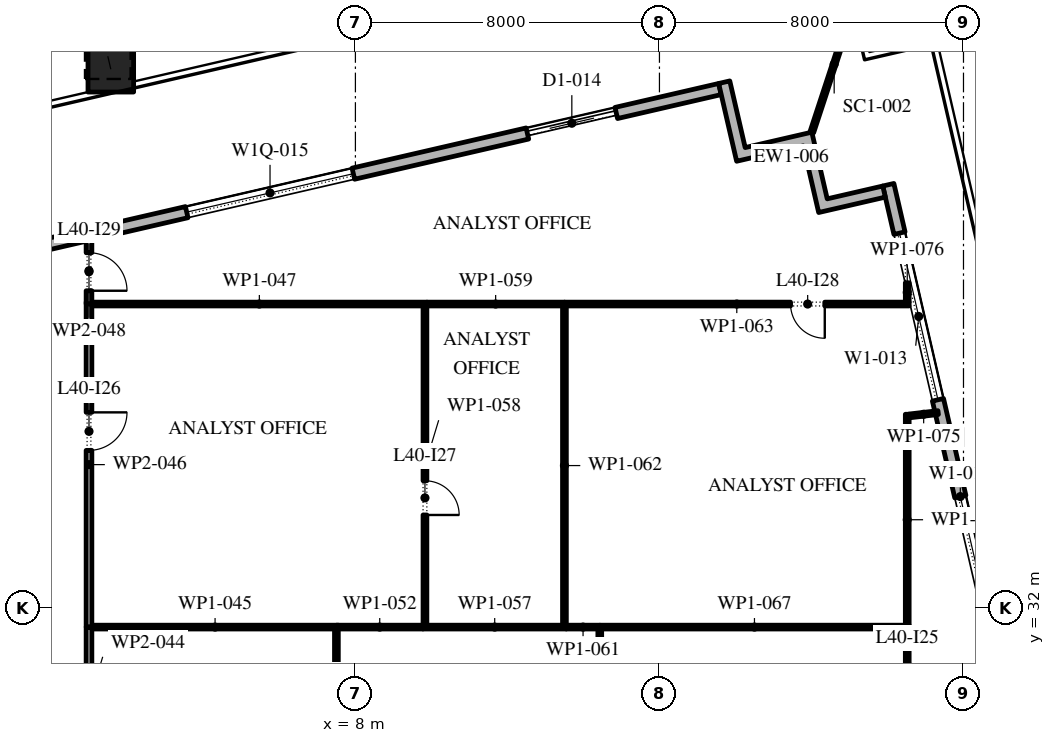
"""IFC4 building model, lengths in metres.
Left out: names, types, materials, properties, quantities, classifications, styles, units other than length and angle.
Written with IfcOpenShell. Run it as: python <this file> out.ifc"""

import sys

from ifc_helpers import new_model, si_unit, direction, frame, frame_2d, origin, origin_2d, place, context, subcontext, project, spatial, polyline, rectangle, outline, extrude, element, fill, save


model = new_model("IFC4")
c1 = context("Model", 3, precision=1e-05, world=origin(), true_north=direction((0.0, 1.0)))
c2 = subcontext(c1, "Body", "Model", "MODEL_VIEW")
j1 = project(units=[si_unit("LENGTHUNIT", "METRE"), si_unit("PLANEANGLEUNIT", "RADIAN")], contexts=[c1])
p1 = place(None, origin())
s1 = spatial("IfcSite", under=j1, at=p1, CompositionType="ELEMENT")
p2 = place(p1, origin())
s2 = spatial("IfcBuilding", under=s1, at=p2, CompositionType="ELEMENT")
p3 = place(p2, frame((0.0, 0.0, 184.2)))
s3 = spatial("IfcBuildingStorey", under=s2, at=p3, CompositionType="ELEMENT", Elevation=184.2)
p4 = place(p3, frame((1.564, 46.178, 0.0), z_axis=(-0.018825666958, 0.081616506903, 0.99648599592), x_axis=(-0.974414501624, -0.224758490439, 0.0)))
e1 = element("IfcColumn", 1, at=p4, inside=s3, PredefinedType="COLUMN", context=c2, shape_type="SweptSolid", body=[
    extrude(rectangle(XDim=1.2, YDim=1.2, at=origin_2d()), origin(), (0.0, 0.0, 1.0), 4.215),
])
p5 = place(p3, frame((33.157, -5.092, 0.0), z_axis=(0.0, 0.0, 1.0), x_axis=(-0.224950279389, 0.974370243697, 0.0)))
e2 = element("IfcWall", 2, at=p5, inside=s3, PredefinedType="STANDARD", context=c2, shape_type="SweptSolid", body=[
    extrude(rectangle(XDim=49.5, YDim=0.3, at=frame_2d((24.75, 0.0))), origin(), (0.0, 0.0, 1.0), 4.0),
])
p6 = place(p5, frame((2.207, 0.0, 0.0)))
e3 = element("IfcOpeningElement", 3, at=p6, cuts=e2, PredefinedType="OPENING", context=c2, shape_type="SweptSolid", body=[
    extrude(rectangle(XDim=2.4, YDim=3.125, at=frame_2d((1.2, 1.562))), frame((0.0, 0.16, 0.0), z_axis=(0.0, -1.0, 0.0), x_axis=(1.0, 0.0, 0.0)), (0.0, 0.0, 1.0), 0.32),
])
p7 = place(p5, frame((8.121, 0.0, 0.45)))
e4 = element("IfcOpeningElement", 4, at=p7, cuts=e2, PredefinedType="OPENING", context=c2, shape_type="SweptSolid", body=[
    extrude(rectangle(XDim=4.5, YDim=2.875, at=frame_2d((2.25, 1.438))), frame((0.0, 0.16, 0.0), z_axis=(0.0, -1.0, 0.0), x_axis=(1.0, 0.0, 0.0)), (0.0, 0.0, 1.0), 0.32),
])
p8 = place(p5, frame((15.236, 0.0, 0.45)))
e5 = element("IfcOpeningElement", 5, at=p8, cuts=e2, PredefinedType="OPENING", context=c2, shape_type="SweptSolid", body=[
    extrude(rectangle(XDim=4.5, YDim=2.875, at=frame_2d((2.25, 1.438))), frame((0.0, 0.16, 0.0), z_axis=(0.0, -1.0, 0.0), x_axis=(1.0, 0.0, 0.0)), (0.0, 0.0, 1.0), 0.32),
])
p9 = place(p5, frame((22.35, 0.0, 0.45)))
e6 = element("IfcOpeningElement", 6, at=p9, cuts=e2, PredefinedType="OPENING", context=c2, shape_type="SweptSolid", body=[
    extrude(rectangle(XDim=4.5, YDim=3.0, at=frame_2d((2.25, 1.5))), frame((0.0, 0.16, 0.0), z_axis=(0.0, -1.0, 0.0), x_axis=(1.0, 0.0, 0.0)), (0.0, 0.0, 1.0), 0.32),
])
p10 = place(p5, frame((30.514, 0.0, 0.0)))
e7 = element("IfcOpeningElement", 7, at=p10, cuts=e2, PredefinedType="OPENING", context=c2, shape_type="SweptSolid", body=[
    extrude(rectangle(XDim=2.4, YDim=3.45, at=frame_2d((1.2, 1.725))), frame((0.0, 0.16, 0.0), z_axis=(0.0, -1.0, 0.0), x_axis=(1.0, 0.0, 0.0)), (0.0, 0.0, 1.0), 0.32),
])
p11 = place(p5, frame((36.579, 0.0, 0.45)))
e8 = element("IfcOpeningElement", 8, at=p11, cuts=e2, PredefinedType="OPENING", context=c2, shape_type="SweptSolid", body=[
    extrude(rectangle(XDim=4.5, YDim=3.05, at=frame_2d((2.25, 1.525))), frame((0.0, 0.16, 0.0), z_axis=(0.0, -1.0, 0.0), x_axis=(1.0, 0.0, 0.0)), (0.0, 0.0, 1.0), 0.32),
])
p12 = place(p5, frame((43.693, 0.0, 0.45)))
e9 = element("IfcOpeningElement", 9, at=p12, cuts=e2, PredefinedType="OPENING", context=c2, shape_type="SweptSolid", body=[
    extrude(rectangle(XDim=4.5, YDim=3.05, at=frame_2d((2.25, 1.525))), frame((0.0, 0.16, 0.0), z_axis=(0.0, -1.0, 0.0), x_axis=(1.0, 0.0, 0.0)), (0.0, 0.0, 1.0), 0.32),
])
p13 = place(p3, frame((17.592, 45.657, 0.0), z_axis=(0.0, 0.0, 1.0), x_axis=(-0.974370243697, -0.224950279389, 0.0)))
e10 = element("IfcWall", 10, at=p13, inside=s3, PredefinedType="STANDARD", context=c2, shape_type="SweptSolid", body=[
    extrude(rectangle(XDim=49.5, YDim=0.3, at=frame_2d((24.75, 0.0))), origin(), (0.0, 0.0, 1.0), 4.0),
])
p14 = place(p13, frame((2.8, 0.0, 0.0)))
e11 = element("IfcOpeningElement", 11, at=p14, cuts=e10, PredefinedType="OPENING", context=c2, shape_type="SweptSolid", body=[
    extrude(rectangle(XDim=2.4, YDim=3.5, at=frame_2d((1.2, 1.75))), frame((0.0, 0.16, 0.0), z_axis=(0.0, -1.0, 0.0), x_axis=(1.0, 0.0, 0.0)), (0.0, 0.0, 1.0), 0.32),
])
p15 = place(p13, frame((9.9, 0.0, 0.45)))
e12 = element("IfcOpeningElement", 12, at=p15, cuts=e10, PredefinedType="OPENING", context=c2, shape_type="SweptSolid", body=[
    extrude(rectangle(XDim=4.5, YDim=2.45, at=frame_2d((2.25, 1.225))), frame((0.0, 0.16, 0.0), z_axis=(0.0, -1.0, 0.0), x_axis=(1.0, 0.0, 0.0)), (0.0, 0.0, 1.0), 0.32),
])
p16 = place(p13, frame((18.2, 0.0, 0.45)))
e13 = element("IfcOpeningElement", 13, at=p16, cuts=e10, PredefinedType="OPENING", context=c2, shape_type="SweptSolid", body=[
    extrude(rectangle(XDim=4.5, YDim=2.45, at=frame_2d((2.25, 1.225))), frame((0.0, 0.16, 0.0), z_axis=(0.0, -1.0, 0.0), x_axis=(1.0, 0.0, 0.0)), (0.0, 0.0, 1.0), 0.32),
])
p17 = place(p13, frame((26.5, 0.0, 0.45)))
e14 = element("IfcOpeningElement", 14, at=p17, cuts=e10, PredefinedType="OPENING", context=c2, shape_type="SweptSolid", body=[
    extrude(rectangle(XDim=4.5, YDim=2.525, at=frame_2d((2.25, 1.262))), frame((0.0, 0.16, 0.0), z_axis=(0.0, -1.0, 0.0), x_axis=(1.0, 0.0, 0.0)), (0.0, 0.0, 1.0), 0.32),
])
p18 = place(p13, frame((35.85, 0.0, 0.0)))
e15 = element("IfcOpeningElement", 15, at=p18, cuts=e10, PredefinedType="OPENING", context=c2, shape_type="SweptSolid", body=[
    extrude(rectangle(XDim=2.4, YDim=3.5, at=frame_2d((1.2, 1.75))), frame((0.0, 0.16, 0.0), z_axis=(0.0, -1.0, 0.0), x_axis=(1.0, 0.0, 0.0)), (0.0, 0.0, 1.0), 0.32),
])
p19 = place(p13, frame((43.1, 0.0, 0.45)))
e16 = element("IfcOpeningElement", 16, at=p19, cuts=e10, PredefinedType="OPENING", context=c2, shape_type="SweptSolid", body=[
    extrude(rectangle(XDim=4.5, YDim=2.675, at=frame_2d((2.25, 1.337))), frame((0.0, 0.16, 0.0), z_axis=(0.0, -1.0, 0.0), x_axis=(1.0, 0.0, 0.0)), (0.0, 0.0, 1.0), 0.32),
])
p20 = place(p3, origin())
e17 = element("IfcWall", 17, at=p20, inside=s3, PredefinedType="STANDARD", context=c2, shape_type="SweptSolid", body=[
    extrude(outline(polyline([(19.785, 44.162), (18.031, 43.757), (17.558, 45.803), (17.851, 45.871), (18.256, 44.117), (20.01, 44.522), (20.414, 42.768), (21.876, 43.105), (21.943, 42.813), (20.19, 42.408), (19.785, 44.162)])), origin(), (0.0, 0.0, 1.0), 4.0),
])
p21 = place(p3, frame((20.01, 44.522, -0.05), z_axis=(0.0, 0.0, 1.0), x_axis=(0.312333902814, 0.949972385469, 0.0)))
e18 = element("IfcWall", 18, at=p21, inside=s3, PredefinedType="STANDARD", context=c2, shape_type="SweptSolid", body=[
    extrude(rectangle(XDim=3.764, YDim=0.1, at=frame_2d((1.882, 0.0))), origin(), (0.0, 0.0, 1.0), 4.05),
])
p22 = place(p3, frame((0.99, 31.5, 0.0), z_axis=(0.0, 0.0, 1.0), x_axis=(0.0, -1.0, 0.0)))
e19 = element("IfcWall", 19, at=p22, inside=s3, PredefinedType="PARTITIONING", context=c2, shape_type="SweptSolid", body=[
    extrude(rectangle(XDim=3.95, YDim=0.15, at=frame_2d((1.975, 0.0))), origin(), (0.0, 0.0, 1.0), 4.0),
])
p23 = place(p22, frame((2.35, 0.0, 0.0)))
e20 = element("IfcOpeningElement", 20, at=p23, cuts=e19, PredefinedType="OPENING", context=c2, shape_type="SweptSolid", body=[
    extrude(rectangle(XDim=1.0, YDim=2.1, at=frame_2d((0.5, 1.05))), frame((0.0, 0.085, 0.0), z_axis=(0.0, -1.0, 0.0), x_axis=(1.0, 0.0, 0.0)), (0.0, 0.0, 1.0), 0.17),
])
p24 = place(p3, frame((1.065, 31.5, 0.0), z_axis=(0.0, 0.0, 1.0), x_axis=(1.0, 0.0, 0.0)))
e21 = element("IfcWall", 21, at=p24, inside=s3, PredefinedType="PARTITIONING", context=c2, shape_type="SweptSolid", body=[
    extrude(rectangle(XDim=6.485, YDim=0.1, at=frame_2d((3.243, 0.0))), origin(), (0.0, 0.0, 1.0), 4.0),
])
p25 = place(p3, frame((0.99, 40.05, 0.0), z_axis=(0.0, 0.0, 1.0), x_axis=(0.0, -1.0, 0.0)))
e22 = element("IfcWall", 22, at=p25, inside=s3, PredefinedType="PARTITIONING", context=c2, shape_type="SweptSolid", body=[
    extrude(rectangle(XDim=8.55, YDim=0.15, at=frame_2d((4.275, 0.0))), origin(), (0.0, 0.0, 1.0), 4.0),
])
p26 = place(p25, frame((2.9, 0.0, 0.0)))
e23 = element("IfcOpeningElement", 23, at=p26, cuts=e22, PredefinedType="OPENING", context=c2, shape_type="SweptSolid", body=[
    extrude(rectangle(XDim=1.0, YDim=2.1, at=frame_2d((0.5, 1.05))), frame((0.0, 0.085, 0.0), z_axis=(0.0, -1.0, 0.0), x_axis=(1.0, 0.0, 0.0)), (0.0, 0.0, 1.0), 0.17),
])
p27 = place(p3, frame((1.065, 40.0, 0.0), z_axis=(0.0, 0.0, 1.0), x_axis=(1.0, 0.0, 0.0)))
e24 = element("IfcWall", 24, at=p27, inside=s3, PredefinedType="PARTITIONING", context=c2, shape_type="SweptSolid", body=[
    extrude(rectangle(XDim=8.815, YDim=0.1, at=frame_2d((4.407, 0.0))), origin(), (0.0, 0.0, 1.0), 4.0),
])
p28 = place(p3, frame((0.99, 41.753, 0.0), z_axis=(0.0, 0.0, 1.0), x_axis=(0.0, -1.0, 0.0)))
e25 = element("IfcWall", 25, at=p28, inside=s3, PredefinedType="PARTITIONING", context=c2, shape_type="SweptSolid", body=[
    extrude(rectangle(XDim=1.753, YDim=0.15, at=frame_2d((0.876, 0.0))), origin(), (0.0, 0.0, 1.0), 4.0),
])
p29 = place(p28, frame((0.403, 0.0, 0.0)))
e26 = element("IfcOpeningElement", 26, at=p29, cuts=e25, PredefinedType="OPENING", context=c2, shape_type="SweptSolid", body=[
    extrude(rectangle(XDim=1.0, YDim=2.1, at=frame_2d((0.5, 1.05))), frame((0.0, 0.085, 0.0), z_axis=(0.0, -1.0, 0.0), x_axis=(1.0, 0.0, 0.0)), (0.0, 0.0, 1.0), 0.17),
])
p30 = place(p3, frame((7.5, 31.45, 0.0), z_axis=(0.0, 0.0, 1.0), x_axis=(0.0, -1.0, 0.0)))
e27 = element("IfcWall", 27, at=p30, inside=s3, PredefinedType="PARTITIONING", context=c2, shape_type="SweptSolid", body=[
    extrude(rectangle(XDim=3.9, YDim=0.1, at=frame_2d((1.95, 0.0))), origin(), (0.0, 0.0, 1.0), 4.0),
])
p31 = place(p30, frame((1.85, 0.0, 0.0)))
e28 = element("IfcOpeningElement", 28, at=p31, cuts=e27, PredefinedType="OPENING", context=c2, shape_type="SweptSolid", body=[
    extrude(rectangle(XDim=0.9, YDim=2.1, at=frame_2d((0.45, 1.05))), frame((0.0, 0.06, 0.0), z_axis=(0.0, -1.0, 0.0), x_axis=(1.0, 0.0, 0.0)), (0.0, 0.0, 1.0), 0.12),
])
p32 = place(p3, frame((7.5, 31.5, 0.0), z_axis=(0.0, 0.0, 1.0), x_axis=(1.0, 0.0, 0.0)))
e29 = element("IfcWall", 29, at=p32, inside=s3, PredefinedType="PARTITIONING", context=c2, shape_type="SweptSolid", body=[
    extrude(rectangle(XDim=2.28, YDim=0.1, at=frame_2d((1.14, 0.0))), origin(), (0.0, 0.0, 1.0), 4.0),
])
p33 = place(p3, frame((9.78, 31.5, 0.0), z_axis=(0.0, 0.0, 1.0), x_axis=(1.0, 0.0, 0.0)))
e30 = element("IfcWall", 30, at=p33, inside=s3, PredefinedType="PARTITIONING", context=c2, shape_type="SweptSolid", body=[
    extrude(rectangle(XDim=3.77, YDim=0.1, at=frame_2d((1.885, 0.0))), origin(), (0.0, 0.0, 1.0), 4.0),
])
p34 = place(p3, frame((9.83, 39.95, 0.0), z_axis=(0.0, 0.0, 1.0), x_axis=(0.0, -1.0, 0.0)))
e31 = element("IfcWall", 31, at=p34, inside=s3, PredefinedType="PARTITIONING", context=c2, shape_type="SweptSolid", body=[
    extrude(rectangle(XDim=8.4, YDim=0.1, at=frame_2d((4.2, 0.0))), origin(), (0.0, 0.0, 1.0), 4.0),
])
p35 = place(p34, frame((4.6, 0.0, 0.0)))
e32 = element("IfcOpeningElement", 32, at=p35, cuts=e31, PredefinedType="OPENING", context=c2, shape_type="SweptSolid", body=[
    extrude(rectangle(XDim=0.9, YDim=2.1, at=frame_2d((0.45, 1.05))), frame((0.0, 0.06, 0.0), z_axis=(0.0, -1.0, 0.0), x_axis=(1.0, 0.0, 0.0)), (0.0, 0.0, 1.0), 0.12),
])
p36 = place(p3, frame((9.88, 40.0, 0.0), z_axis=(0.0, 0.0, 1.0), x_axis=(1.0, 0.0, 0.0)))
e33 = element("IfcWall", 33, at=p36, inside=s3, PredefinedType="PARTITIONING", context=c2, shape_type="SweptSolid", body=[
    extrude(rectangle(XDim=3.62, YDim=0.1, at=frame_2d((1.81, 0.0))), origin(), (0.0, 0.0, 1.0), 4.0),
])
p37 = place(p3, frame((13.55, 31.5, 0.0), z_axis=(0.0, 0.0, 1.0), x_axis=(1.0, 0.0, 0.0)))
e34 = element("IfcWall", 34, at=p37, inside=s3, PredefinedType="PARTITIONING", context=c2, shape_type="SweptSolid", body=[
    extrude(rectangle(XDim=0.88, YDim=0.1, at=frame_2d((0.44, 0.0))), origin(), (0.0, 0.0, 1.0), 4.0),
])
p38 = place(p3, frame((13.5, 39.95, 0.0), z_axis=(0.0, 0.0, 1.0), x_axis=(0.0, -1.0, 0.0)))
e35 = element("IfcWall", 35, at=p38, inside=s3, PredefinedType="PARTITIONING", context=c2, shape_type="SweptSolid", body=[
    extrude(rectangle(XDim=8.4, YDim=0.1, at=frame_2d((4.2, 0.0))), origin(), (0.0, 0.0, 1.0), 4.0),
])
p39 = place(p3, frame((13.5, 40.0, 0.0), z_axis=(0.0, 0.0, 1.0), x_axis=(1.0, 0.0, 0.0)))
e36 = element("IfcWall", 36, at=p39, inside=s3, PredefinedType="PARTITIONING", context=c2, shape_type="SweptSolid", body=[
    extrude(rectangle(XDim=9.07, YDim=0.1, at=frame_2d((4.535, 0.0))), origin(), (0.0, 0.0, 1.0), 4.0),
])
p40 = place(p39, frame((5.95, 0.0, 0.0)))
e37 = element("IfcOpeningElement", 37, at=p40, cuts=e36, PredefinedType="OPENING", context=c2, shape_type="SweptSolid", body=[
    extrude(rectangle(XDim=0.9, YDim=2.1, at=frame_2d((0.45, 1.05))), frame((0.0, 0.06, 0.0), z_axis=(0.0, -1.0, 0.0), x_axis=(1.0, 0.0, 0.0)), (0.0, 0.0, 1.0), 0.12),
])
p41 = place(p3, frame((14.43, 31.45, 0.0), z_axis=(0.0, 0.0, 1.0), x_axis=(0.0, -1.0, 0.0)))
e38 = element("IfcWall", 38, at=p41, inside=s3, PredefinedType="PARTITIONING", context=c2, shape_type="SweptSolid", body=[
    extrude(rectangle(XDim=6.05, YDim=0.1, at=frame_2d((3.025, 0.0))), origin(), (0.0, 0.0, 1.0), 4.0),
])
p42 = place(p3, frame((14.43, 31.5, 0.0), z_axis=(0.0, 0.0, 1.0), x_axis=(1.0, 0.0, 0.0)))
e39 = element("IfcWall", 39, at=p42, inside=s3, PredefinedType="PARTITIONING", context=c2, shape_type="SweptSolid", body=[
    extrude(rectangle(XDim=8.14, YDim=0.1, at=frame_2d((4.07, 0.0))), origin(), (0.0, 0.0, 1.0), 4.0),
])
p43 = place(p3, frame((22.52, 27.275, 0.0), z_axis=(0.0, 0.0, 1.0), x_axis=(0.0, 1.0, 0.0)))
e40 = element("IfcWall", 40, at=p43, inside=s3, PredefinedType="PARTITIONING", context=c2, shape_type="SweptSolid", body=[
    extrude(rectangle(XDim=4.175, YDim=0.1, at=frame_2d((2.087, 0.0))), origin(), (0.0, 0.0, 1.0), 4.0),
])
p44 = place(p43, frame((2.375, 0.0, 0.0)))
e41 = element("IfcOpeningElement", 41, at=p44, cuts=e40, PredefinedType="OPENING", context=c2, shape_type="SweptSolid", body=[
    extrude(rectangle(XDim=0.9, YDim=2.1, at=frame_2d((0.45, 1.05))), frame((0.0, 0.06, 0.0), z_axis=(0.0, -1.0, 0.0), x_axis=(1.0, 0.0, 0.0)), (0.0, 0.0, 1.0), 0.12),
])
p45 = place(p3, frame((22.52, 31.55, 0.0), z_axis=(0.0, 0.0, 1.0), x_axis=(0.0, 1.0, 0.0)))
e42 = element("IfcWall", 42, at=p45, inside=s3, PredefinedType="PARTITIONING", context=c2, shape_type="SweptSolid", body=[
    extrude(rectangle(XDim=5.55, YDim=0.1, at=frame_2d((2.775, 0.0))), origin(), (0.0, 0.0, 1.0), 4.0),
])
p46 = place(p3, frame((22.57, 37.056, 0.0), z_axis=(0.0, 0.0, 1.0), x_axis=(0.993410326243, 0.114612057454, 0.0)))
e43 = element("IfcWall", 43, at=p46, inside=s3, PredefinedType="PARTITIONING", context=c2, shape_type="SweptSolid", body=[
    extrude(rectangle(XDim=0.769, YDim=0.1, at=frame_2d((0.385, 0.0))), origin(), (0.0, 0.0, 1.0), 4.0),
])
p47 = place(p3, frame((22.52, 40.05, 0.0), z_axis=(0.0, 0.0, 1.0), x_axis=(0.0, 1.0, 0.0)))
e44 = element("IfcWall", 44, at=p47, inside=s3, PredefinedType="PARTITIONING", context=c2, shape_type="SweptSolid", body=[
    extrude(rectangle(XDim=0.51, YDim=0.1, at=frame_2d((0.255, 0.0))), origin(), (0.0, 0.0, 1.0), 4.0),
])
p48 = place(p11, origin())
e45 = element("IfcWindow", 45, at=p48, inside=s3, PartitioningType="DOUBLE_PANEL_VERTICAL", PredefinedType="WINDOW", context=c2, shape_type="SweptSolid", body=[
    extrude(rectangle(XDim=4.5, YDim=3.05, at=frame_2d((2.25, 1.525))), frame((0.0, 0.03, 0.0), z_axis=(0.0, -1.0, 0.0), x_axis=(1.0, 0.0, 0.0)), (0.0, 0.0, 1.0), 0.06),
])
fill(e8, e45)
p49 = place(p12, origin())
e46 = element("IfcWindow", 46, at=p49, inside=s3, PartitioningType="DOUBLE_PANEL_VERTICAL", PredefinedType="WINDOW", context=c2, shape_type="SweptSolid", body=[
    extrude(rectangle(XDim=4.5, YDim=3.05, at=frame_2d((2.25, 1.525))), frame((0.0, 0.03, 0.0), z_axis=(0.0, -1.0, 0.0), x_axis=(1.0, 0.0, 0.0)), (0.0, 0.0, 1.0), 0.06),
])
fill(e9, e46)
p50 = place(p14, origin())
e47 = element("IfcDoor", 47, at=p50, inside=s3, OperationType="DOUBLE_DOOR_SLIDING", PredefinedType="DOOR", context=c2, shape_type="SweptSolid", body=[
    extrude(rectangle(XDim=2.4, YDim=3.5, at=frame_2d((1.2, 1.75))), frame((0.0, 0.025, 0.0), z_axis=(0.0, -1.0, 0.0), x_axis=(1.0, 0.0, 0.0)), (0.0, 0.0, 1.0), 0.05),
])
fill(e11, e47)
p51 = place(p15, origin())
e48 = element("IfcWindow", 48, at=p51, inside=s3, PartitioningType="DOUBLE_PANEL_VERTICAL", PredefinedType="WINDOW", context=c2, shape_type="SweptSolid", body=[
    extrude(rectangle(XDim=4.5, YDim=2.45, at=frame_2d((2.25, 1.225))), frame((0.0, 0.03, 0.0), z_axis=(0.0, -1.0, 0.0), x_axis=(1.0, 0.0, 0.0)), (0.0, 0.0, 1.0), 0.06),
])
fill(e12, e48)
p52 = place(p26, origin())
e49 = element("IfcDoor", 49, at=p52, inside=s3, OperationType="SINGLE_SWING_RIGHT", PredefinedType="DOOR", context=c2, shape_type="SweptSolid", body=[
    extrude(rectangle(XDim=1.0, YDim=2.1, at=frame_2d((0.5, 1.05))), frame((0.0, 0.025, 0.0), z_axis=(0.0, -1.0, 0.0), x_axis=(1.0, 0.0, 0.0)), (0.0, 0.0, 1.0), 0.05),
])
fill(e23, e49)
p53 = place(p35, origin())
e50 = element("IfcDoor", 50, at=p53, inside=s3, OperationType="SINGLE_SWING_LEFT", PredefinedType="DOOR", context=c2, shape_type="SweptSolid", body=[
    extrude(rectangle(XDim=0.9, YDim=2.1, at=frame_2d((0.45, 1.05))), frame((0.0, 0.025, 0.0), z_axis=(0.0, -1.0, 0.0), x_axis=(1.0, 0.0, 0.0)), (0.0, 0.0, 1.0), 0.05),
])
fill(e32, e50)
p54 = place(p40, frame((0.9, 0.0, 0.0), z_axis=(0.0, 0.0, 1.0), x_axis=(-1.0, 0.0, 0.0)))
e51 = element("IfcDoor", 51, at=p54, inside=s3, OperationType="SINGLE_SWING_RIGHT", PredefinedType="DOOR", context=c2, shape_type="SweptSolid", body=[
    extrude(rectangle(XDim=0.9, YDim=2.1, at=frame_2d((0.45, 1.05))), frame((0.0, 0.025, 0.0), z_axis=(0.0, -1.0, 0.0), x_axis=(1.0, 0.0, 0.0)), (0.0, 0.0, 1.0), 0.05),
])
fill(e37, e51)
p55 = place(p29, origin())
e52 = element("IfcDoor", 52, at=p55, inside=s3, OperationType="SINGLE_SWING_LEFT", PredefinedType="DOOR", context=c2, shape_type="SweptSolid", body=[
    extrude(rectangle(XDim=1.0, YDim=2.1, at=frame_2d((0.5, 1.05))), frame((0.0, 0.025, 0.0), z_axis=(0.0, -1.0, 0.0), x_axis=(1.0, 0.0, 0.0)), (0.0, 0.0, 1.0), 0.05),
])
fill(e26, e52)
save(model, sys.argv[1])
